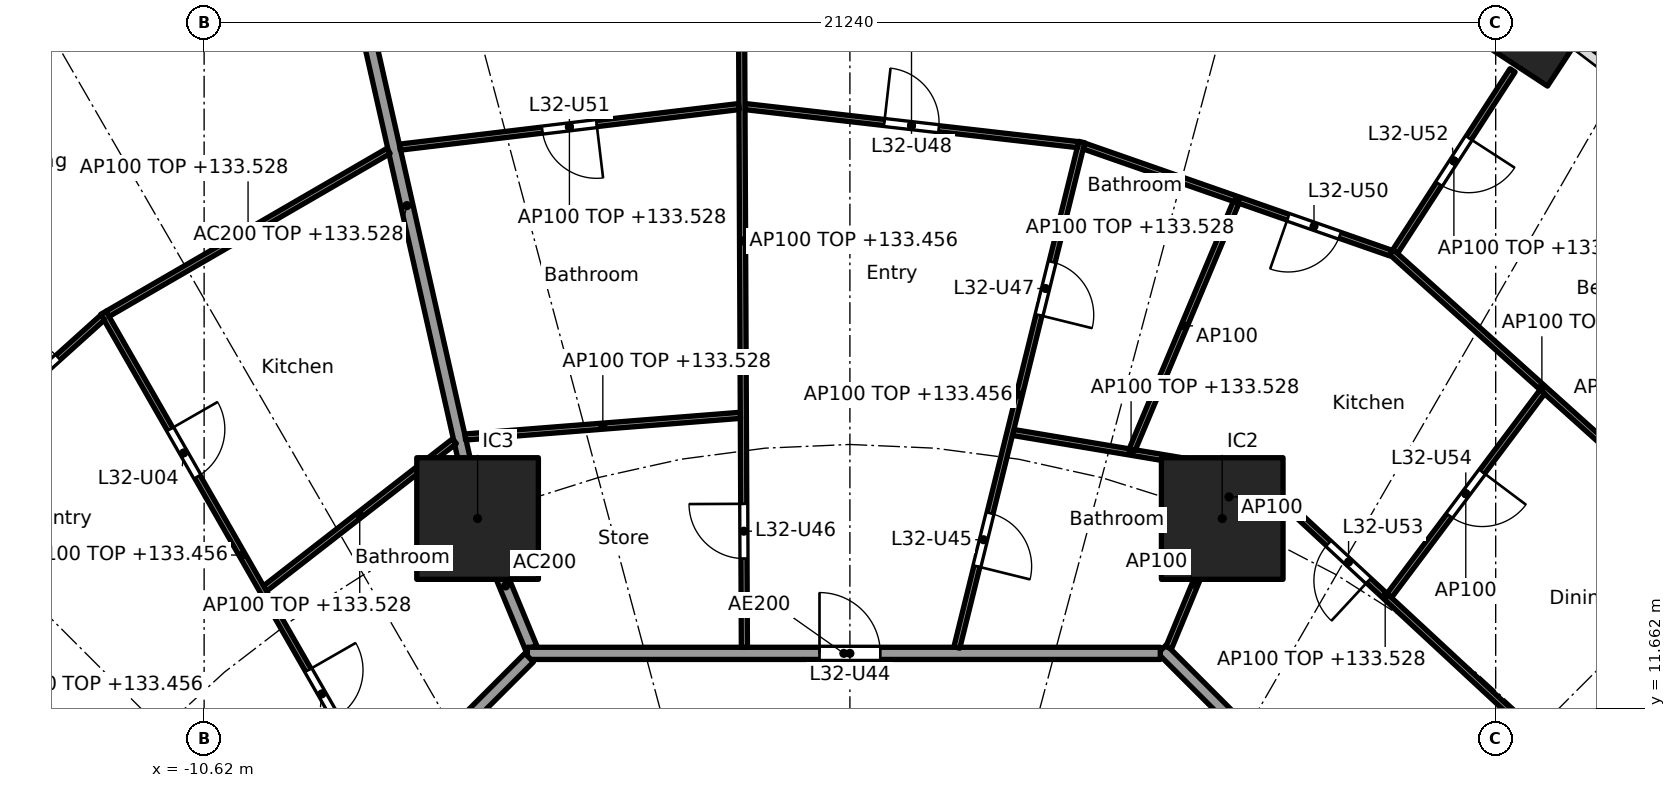
"""IFC4 building model, lengths in metres.
Left out: names, types, materials, properties, quantities, classifications, styles, units other than length and angle.
Written with IfcOpenShell. Run it as: python <this file> out.ifc"""

import sys

from ifc_helpers import new_model, si_unit, direction, frame, frame_2d, origin, origin_2d, place, context, subcontext, project, spatial, rectangle, hollow_rectangle, extrude, element, fill, save


model = new_model("IFC4")
c1 = context("Model", 3, precision=1e-05, world=origin(), true_north=direction((0.0, 1.0)))
c2 = subcontext(c1, "Body", "Model", "MODEL_VIEW")
j1 = project(units=[si_unit("LENGTHUNIT", "METRE"), si_unit("PLANEANGLEUNIT", "RADIAN")], contexts=[c1])
p1 = place(None, origin())
s1 = spatial("IfcSite", under=j1, at=p1, CompositionType="ELEMENT")
p2 = place(p1, origin())
s2 = spatial("IfcBuilding", under=s1, at=p2, CompositionType="ELEMENT")
p3 = place(p2, frame((0.0, 0.0, 130.7)))
s3 = spatial("IfcBuildingStorey", under=s2, at=p3, CompositionType="ELEMENT", Elevation=130.7)
p4 = place(p3, frame((11.218, 22.599, 0.0), z_axis=(0.0, 0.0, 1.0), x_axis=(-0.835766105673, 0.54908561865, 0.0)))
e1 = element("IfcColumn", 1, at=p4, inside=s3, PredefinedType="COLUMN", context=c2, shape_type="SweptSolid", body=[
    extrude(hollow_rectangle(XDim=1.2, YDim=0.9, WallThickness=0.04, at=origin_2d()), origin(), (0.0, 0.0, 1.0), 3.7),
])
for number, where, z_axis, x_axis in (
    (2, (6.123, 14.782, 0.0), (0.0, 0.0, 1.0), (1.0, 0.0, 0.0)),
    (3, (-6.123, 14.782, 0.0), (0.0, 0.0, 1.0), (1.0, 0.0, 0.0)),
):
    element("IfcColumn", number, at=place(p3, frame(where, z_axis=z_axis, x_axis=x_axis)), inside=s3, PredefinedType="COLUMN", context=c2, shape_type="SweptSolid", body=[
        extrude(rectangle(XDim=2.0, YDim=2.0, at=origin_2d()), origin(), (0.0, 0.0, 1.0), 3.7),
    ])
p5 = place(p3, frame((-5.243, 12.657, 0.0), z_axis=(0.0, 0.0, 1.0), x_axis=(-0.38273085373, 0.923859888513, 0.0)))
e4 = element("IfcWall", 4, at=p5, inside=s3, PredefinedType="PARTITIONING", context=c2, shape_type="SweptSolid", body=[
    extrude(rectangle(XDim=2.199, YDim=0.2, at=frame_2d((1.1, 0.0))), origin(), (0.0, 0.0, 1.0), 3.44),
])
p6 = place(p3, frame((-6.134, 14.831, 0.0), z_axis=(0.0, 0.0, 1.0), x_axis=(-0.220337590808, 0.975423675167, 0.0)))
e5 = element("IfcWall", 5, at=p6, inside=s3, PredefinedType="PARTITIONING", context=c2, shape_type="SweptSolid", body=[
    extrude(rectangle(XDim=10.451, YDim=0.2, at=frame_2d((5.226, 0.0))), origin(), (0.0, 0.0, 1.0), 2.828),
])
p7 = place(p3, frame((12.635, 5.134, 0.0), z_axis=(0.0, 0.0, 1.0), x_axis=(-0.707106781187, 0.707106781187, 0.0)))
e6 = element("IfcWall", 6, at=p7, inside=s3, PredefinedType="PARTITIONING", context=c2, shape_type="SweptSolid", body=[
    extrude(rectangle(XDim=10.609, YDim=0.2, at=frame_2d((5.305, 0.0))), origin(), (0.0, 0.0, 1.0), 3.44),
])
p8 = place(p3, frame((5.104, 12.565, 0.0), z_axis=(0.0, 0.0, 1.0), x_axis=(-1.0, 0.0, 0.0)))
e7 = element("IfcWall", 7, at=p8, inside=s3, PredefinedType="PARTITIONING", context=c2, shape_type="SweptSolid", body=[
    extrude(rectangle(XDim=10.409, YDim=0.2, at=frame_2d((5.205, 0.0))), origin(), (0.0, 0.0, 1.0), 3.44),
])
p9 = place(p8, frame((4.604, 0.0, 0.0)))
e8 = element("IfcOpeningElement", 8, at=p9, cuts=e7, PredefinedType="OPENING", context=c2, shape_type="SweptSolid", body=[
    extrude(rectangle(XDim=1.0, YDim=2.1, at=frame_2d((0.5, 1.05))), frame((0.0, 0.11, 0.0), z_axis=(0.0, -1.0, 0.0), x_axis=(1.0, 0.0, 0.0)), (0.0, 0.0, 1.0), 0.22),
])
p10 = place(p3, frame((-5.275, 12.494, 0.0), z_axis=(0.0, 0.0, 1.0), x_axis=(-0.707106781187, -0.707106781187, 0.0)))
e9 = element("IfcWall", 9, at=p10, inside=s3, PredefinedType="PARTITIONING", context=c2, shape_type="SweptSolid", body=[
    extrude(rectangle(XDim=10.209, YDim=0.2, at=frame_2d((5.104, 0.0))), origin(), (0.0, 0.0, 1.0), 3.44),
])
p11 = place(p10, frame((4.604, 0.0, 0.0)))
e10 = element("IfcOpeningElement", 10, at=p11, cuts=e9, PredefinedType="OPENING", context=c2, shape_type="SweptSolid", body=[
    extrude(rectangle(XDim=1.0, YDim=2.1, at=frame_2d((0.5, 1.05))), frame((0.0, 0.11, 0.0), z_axis=(0.0, -1.0, 0.0), x_axis=(1.0, 0.0, 0.0)), (0.0, 0.0, 1.0), 0.22),
])
p12 = place(p3, frame((11.029, 11.443, 0.0), z_axis=(0.0, 0.0, 1.0), x_axis=(-0.733121281629, 0.680097924143, 0.0)))
e11 = element("IfcWall", 11, at=p12, inside=s3, PredefinedType="PARTITIONING", context=c2, shape_type="SweptSolid", body=[
    extrude(rectangle(XDim=6.073, YDim=0.1, at=frame_2d((3.037, 0.0))), origin(), (0.0, 0.0, 1.0), 2.828),
])
p13 = place(p12, frame((3.408, 0.0, 0.0)))
e12 = element("IfcOpeningElement", 12, at=p13, cuts=e11, PredefinedType="OPENING", context=c2, shape_type="SweptSolid", body=[
    extrude(rectangle(XDim=0.9, YDim=2.1, at=frame_2d((0.45, 1.05))), frame((0.0, 0.06, 0.0), z_axis=(0.0, -1.0, 0.0), x_axis=(1.0, 0.0, 0.0)), (0.0, 0.0, 1.0), 0.12),
])
p14 = place(p3, frame((13.856, 14.714, 0.0), z_axis=(0.0, 0.0, 1.0), x_axis=(-0.743793479211, 0.668409500444, 0.0)))
e13 = element("IfcWall", 13, at=p14, inside=s3, PredefinedType="PARTITIONING", context=c2, shape_type="SweptSolid", body=[
    extrude(rectangle(XDim=6.659, YDim=0.1, at=frame_2d((3.329, 0.0))), origin(), (0.0, 0.0, 1.0), 2.828),
])
p15 = place(p3, frame((8.87, 13.514, 0.0), z_axis=(0.0, 0.0, 1.0), x_axis=(0.600475102839, 0.79964345234, 0.0)))
e14 = element("IfcWall", 14, at=p15, inside=s3, PredefinedType="PARTITIONING", context=c2, shape_type="SweptSolid", body=[
    extrude(rectangle(XDim=4.192, YDim=0.1, at=frame_2d((2.096, 0.0))), origin(), (0.0, 0.0, 1.0), 3.44),
])
p16 = place(p15, frame((1.646, 0.0, 0.0)))
e15 = element("IfcOpeningElement", 15, at=p16, cuts=e14, PredefinedType="OPENING", context=c2, shape_type="SweptSolid", body=[
    extrude(rectangle(XDim=0.9, YDim=2.1, at=frame_2d((0.45, 1.05))), frame((0.0, 0.06, 0.0), z_axis=(0.0, -1.0, 0.0), x_axis=(1.0, 0.0, 0.0)), (0.0, 0.0, 1.0), 0.12),
])
p17 = place(p3, frame((5.243, 12.657, 0.0), z_axis=(0.0, 0.0, 1.0), x_axis=(0.382719158442, 0.923864733477, 0.0)))
e16 = element("IfcWall", 16, at=p17, inside=s3, PredefinedType="PARTITIONING", context=c2, shape_type="SweptSolid", body=[
    extrude(rectangle(XDim=2.25, YDim=0.1, at=frame_2d((1.125, 0.0))), origin(), (0.0, 0.0, 1.0), 3.44),
])
p18 = place(p3, frame((6.564, 15.547, 0.0), z_axis=(0.0, 0.0, 1.0), x_axis=(-0.986269521186, 0.165143669511, 0.0)))
e17 = element("IfcWall", 17, at=p18, inside=s3, PredefinedType="PARTITIONING", context=c2, shape_type="SweptSolid", body=[
    extrude(rectangle(XDim=3.934, YDim=0.1, at=frame_2d((1.967, 0.0))), origin(), (0.0, 0.0, 1.0), 2.828),
])
p19 = place(p3, frame((8.968, 19.174, 0.0), z_axis=(0.0, 0.0, 1.0), x_axis=(0.543713319379, 0.83927100887, 0.0)))
e18 = element("IfcWall", 18, at=p19, inside=s3, PredefinedType="PARTITIONING", context=c2, shape_type="SweptSolid", body=[
    extrude(rectangle(XDim=3.549, YDim=0.1, at=frame_2d((1.774, 0.0))), origin(), (0.0, 0.0, 1.0), 2.828),
])
p20 = place(p19, frame((1.324, 0.0, 0.0)))
e19 = element("IfcOpeningElement", 19, at=p20, cuts=e18, PredefinedType="OPENING", context=c2, shape_type="SweptSolid", body=[
    extrude(rectangle(XDim=0.9, YDim=2.1, at=frame_2d((0.45, 1.05))), frame((0.0, 0.06, 0.0), z_axis=(0.0, -1.0, 0.0), x_axis=(1.0, 0.0, 0.0)), (0.0, 0.0, 1.0), 0.12),
])
p21 = place(p3, frame((8.894, 19.148, 0.0), z_axis=(0.0, 0.0, 1.0), x_axis=(-0.944182005381, 0.329424256414, 0.0)))
e20 = element("IfcWall", 20, at=p21, inside=s3, PredefinedType="PARTITIONING", context=c2, shape_type="SweptSolid", body=[
    extrude(rectangle(XDim=5.344, YDim=0.1, at=frame_2d((2.672, 0.0))), origin(), (0.0, 0.0, 1.0), 2.828),
])
p22 = place(p21, frame((0.886, 0.0, 0.0)))
e21 = element("IfcOpeningElement", 21, at=p22, cuts=e20, PredefinedType="OPENING", context=c2, shape_type="SweptSolid", body=[
    extrude(rectangle(XDim=0.9, YDim=2.1, at=frame_2d((0.45, 1.05))), frame((0.0, 0.06, 0.0), z_axis=(0.0, -1.0, 0.0), x_axis=(1.0, 0.0, 0.0)), (0.0, 0.0, 1.0), 0.12),
])
p23 = place(p3, frame((4.643, 15.918, 0.0), z_axis=(0.0, 0.0, 1.0), x_axis=(0.387539433367, 0.921853126906, 0.0)))
e22 = element("IfcWall", 22, at=p23, inside=s3, PredefinedType="PARTITIONING", context=c2, shape_type="SweptSolid", body=[
    extrude(rectangle(XDim=4.408, YDim=0.1, at=frame_2d((2.204, 0.0))), origin(), (0.0, 0.0, 1.0), 3.44),
])
p24 = place(p3, frame((1.759, 12.662, 0.0), z_axis=(0.0, 0.0, 1.0), x_axis=(0.239964949221, 0.970781552743, 0.0)))
e23 = element("IfcWall", 23, at=p24, inside=s3, PredefinedType="PARTITIONING", context=c2, shape_type="SweptSolid", body=[
    extrude(rectangle(XDim=8.562, YDim=0.1, at=frame_2d((4.281, 0.0))), origin(), (0.0, 0.0, 1.0), 2.756),
])
p25 = place(p24, frame((1.375, 0.0, 0.0)))
e24 = element("IfcOpeningElement", 24, at=p25, cuts=e23, PredefinedType="OPENING", context=c2, shape_type="SweptSolid", body=[
    extrude(rectangle(XDim=0.9, YDim=2.1, at=frame_2d((0.45, 1.05))), frame((0.0, 0.06, 0.0), z_axis=(0.0, -1.0, 0.0), x_axis=(1.0, 0.0, 0.0)), (0.0, 0.0, 1.0), 0.12),
])
p26 = place(p24, frame((5.631, 0.0, 0.0)))
e25 = element("IfcOpeningElement", 25, at=p26, cuts=e23, PredefinedType="OPENING", context=c2, shape_type="SweptSolid", body=[
    extrude(rectangle(XDim=0.9, YDim=2.1, at=frame_2d((0.45, 1.05))), frame((0.0, 0.06, 0.0), z_axis=(0.0, -1.0, 0.0), x_axis=(1.0, 0.0, 0.0)), (0.0, 0.0, 1.0), 0.12),
])
p27 = place(p3, frame((3.751, 20.93, 0.0), z_axis=(0.0, 0.0, 1.0), x_axis=(-0.993522105273, 0.113639017658, 0.0)))
e26 = element("IfcWall", 26, at=p27, inside=s3, PredefinedType="PARTITIONING", context=c2, shape_type="SweptSolid", body=[
    extrude(rectangle(XDim=5.513, YDim=0.1, at=frame_2d((2.756, 0.0))), origin(), (0.0, 0.0, 1.0), 2.828),
])
p28 = place(p27, frame((2.306, 0.0, 0.0)))
e27 = element("IfcOpeningElement", 27, at=p28, cuts=e26, PredefinedType="OPENING", context=c2, shape_type="SweptSolid", body=[
    extrude(rectangle(XDim=0.9, YDim=2.1, at=frame_2d((0.45, 1.05))), frame((0.0, 0.06, 0.0), z_axis=(0.0, -1.0, 0.0), x_axis=(1.0, 0.0, 0.0)), (0.0, 0.0, 1.0), 0.12),
])
p29 = place(p3, frame((-1.735, 12.665, 0.0), z_axis=(0.0, 0.0, 1.0), x_axis=(-0.004494500855, 0.99998989968, 0.0)))
e28 = element("IfcWall", 28, at=p29, inside=s3, PredefinedType="PARTITIONING", context=c2, shape_type="SweptSolid", body=[
    extrude(rectangle(XDim=13.363, YDim=0.1, at=frame_2d((6.681, 0.0))), origin(), (0.0, 0.0, 1.0), 2.756),
])
p30 = place(p29, frame((1.459, 0.0, 0.0)))
e29 = element("IfcOpeningElement", 29, at=p30, cuts=e28, PredefinedType="OPENING", context=c2, shape_type="SweptSolid", body=[
    extrude(rectangle(XDim=0.9, YDim=2.1, at=frame_2d((0.45, 1.05))), frame((0.0, 0.06, 0.0), z_axis=(0.0, -1.0, 0.0), x_axis=(1.0, 0.0, 0.0)), (0.0, 0.0, 1.0), 0.12),
])
p31 = place(p29, frame((10.68, 0.0, 0.0)))
e30 = element("IfcOpeningElement", 30, at=p31, cuts=e28, PredefinedType="OPENING", context=c2, shape_type="SweptSolid", body=[
    extrude(rectangle(XDim=0.9, YDim=2.1, at=frame_2d((0.45, 1.05))), frame((0.0, 0.06, 0.0), z_axis=(0.0, -1.0, 0.0), x_axis=(1.0, 0.0, 0.0)), (0.0, 0.0, 1.0), 0.12),
])
p32 = place(p3, frame((-1.802, 16.479, 0.0), z_axis=(0.0, 0.0, 1.0), x_axis=(-0.996907698294, -0.078581429625, 0.0)))
e31 = element("IfcWall", 31, at=p32, inside=s3, PredefinedType="PARTITIONING", context=c2, shape_type="SweptSolid", body=[
    extrude(rectangle(XDim=4.536, YDim=0.1, at=frame_2d((2.268, 0.0))), origin(), (0.0, 0.0, 1.0), 2.828),
])
p33 = place(p3, frame((-1.825, 21.557, 0.0), z_axis=(0.0, 0.0, 1.0), x_axis=(-0.992915053711, -0.11882632753, 0.0)))
e32 = element("IfcWall", 32, at=p33, inside=s3, PredefinedType="PARTITIONING", context=c2, shape_type="SweptSolid", body=[
    extrude(rectangle(XDim=5.615, YDim=0.1, at=frame_2d((2.808, 0.0))), origin(), (0.0, 0.0, 1.0), 2.828),
])
p34 = place(p33, frame((2.358, 0.0, 0.0)))
e33 = element("IfcOpeningElement", 33, at=p34, cuts=e32, PredefinedType="OPENING", context=c2, shape_type="SweptSolid", body=[
    extrude(rectangle(XDim=0.9, YDim=2.1, at=frame_2d((0.45, 1.05))), frame((0.0, 0.06, 0.0), z_axis=(0.0, -1.0, 0.0), x_axis=(1.0, 0.0, 0.0)), (0.0, 0.0, 1.0), 0.12),
])
p35 = place(p3, frame((-6.503, 16.054, 0.0), z_axis=(0.0, 0.0, 1.0), x_axis=(-0.789428807693, -0.613842127574, 0.0)))
e34 = element("IfcWall", 34, at=p35, inside=s3, PredefinedType="PARTITIONING", context=c2, shape_type="SweptSolid", body=[
    extrude(rectangle(XDim=3.948, YDim=0.1, at=frame_2d((1.974, 0.0))), origin(), (0.0, 0.0, 1.0), 2.828),
])
p36 = place(p3, frame((-7.586, 20.827, 0.0), z_axis=(0.0, 0.0, 1.0), x_axis=(-0.865093450578, -0.501610727325, 0.0)))
e35 = element("IfcWall", 35, at=p36, inside=s3, PredefinedType="PARTITIONING", context=c2, shape_type="SweptSolid", body=[
    extrude(rectangle(XDim=5.343, YDim=0.1, at=frame_2d((2.671, 0.0))), origin(), (0.0, 0.0, 1.0), 2.828),
])
p37 = place(p3, frame((-7.708, 10.198, 0.0), z_axis=(0.0, 0.0, 1.0), x_axis=(-0.497449462689, 0.867492957937, 0.0)))
e36 = element("IfcWall", 36, at=p37, inside=s3, PredefinedType="PARTITIONING", context=c2, shape_type="SweptSolid", body=[
    extrude(rectangle(XDim=9.185, YDim=0.1, at=frame_2d((4.592, 0.0))), origin(), (0.0, 0.0, 1.0), 2.756),
])
p38 = place(p37, frame((1.511, 0.0, 0.0)))
e37 = element("IfcOpeningElement", 37, at=p38, cuts=e36, PredefinedType="OPENING", context=c2, shape_type="SweptSolid", body=[
    extrude(rectangle(XDim=0.9, YDim=2.1, at=frame_2d((0.45, 1.05))), frame((0.0, 0.06, 0.0), z_axis=(0.0, -1.0, 0.0), x_axis=(1.0, 0.0, 0.0)), (0.0, 0.0, 1.0), 0.12),
])
p39 = place(p37, frame((6.078, 0.0, 0.0)))
e38 = element("IfcOpeningElement", 38, at=p39, cuts=e36, PredefinedType="OPENING", context=c2, shape_type="SweptSolid", body=[
    extrude(rectangle(XDim=0.9, YDim=2.1, at=frame_2d((0.45, 1.05))), frame((0.0, 0.06, 0.0), z_axis=(0.0, -1.0, 0.0), x_axis=(1.0, 0.0, 0.0)), (0.0, 0.0, 1.0), 0.12),
])
p40 = place(p3, frame((-12.289, 18.089, 0.0), z_axis=(0.0, 0.0, 1.0), x_axis=(-0.743146066164, -0.669129228435, 0.0)))
e39 = element("IfcWall", 39, at=p40, inside=s3, PredefinedType="PARTITIONING", context=c2, shape_type="SweptSolid", body=[
    extrude(rectangle(XDim=5.739, YDim=0.1, at=frame_2d((2.87, 0.0))), origin(), (0.0, 0.0, 1.0), 2.828),
])
p41 = place(p40, frame((0.985, 0.0, 0.0)))
e40 = element("IfcOpeningElement", 40, at=p41, cuts=e39, PredefinedType="OPENING", context=c2, shape_type="SweptSolid", body=[
    extrude(rectangle(XDim=0.9, YDim=2.1, at=frame_2d((0.45, 1.05))), frame((0.0, 0.06, 0.0), z_axis=(0.0, -1.0, 0.0), x_axis=(1.0, 0.0, 0.0)), (0.0, 0.0, 1.0), 0.12),
])
p42 = place(p3, frame((-10.182, 7.729, 0.0), z_axis=(0.0, 0.0, 1.0), x_axis=(-0.702927211734, 0.711261790766, 0.0)))
e41 = element("IfcWall", 41, at=p42, inside=s3, PredefinedType="PARTITIONING", context=c2, shape_type="SweptSolid", body=[
    extrude(rectangle(XDim=9.168, YDim=0.1, at=frame_2d((4.584, 0.0))), origin(), (0.0, 0.0, 1.0), 2.756),
])
p43 = place(p42, frame((1.507, 0.0, 0.0)))
e42 = element("IfcOpeningElement", 42, at=p43, cuts=e41, PredefinedType="OPENING", context=c2, shape_type="SweptSolid", body=[
    extrude(rectangle(XDim=0.9, YDim=2.1, at=frame_2d((0.45, 1.05))), frame((0.0, 0.06, 0.0), z_axis=(0.0, -1.0, 0.0), x_axis=(1.0, 0.0, 0.0)), (0.0, 0.0, 1.0), 0.12),
])
p44 = place(p42, frame((6.067, 0.0, 0.0)))
e43 = element("IfcOpeningElement", 43, at=p44, cuts=e41, PredefinedType="OPENING", context=c2, shape_type="SweptSolid", body=[
    extrude(rectangle(XDim=0.9, YDim=2.1, at=frame_2d((0.45, 1.05))), frame((0.0, 0.06, 0.0), z_axis=(0.0, -1.0, 0.0), x_axis=(1.0, 0.0, 0.0)), (0.0, 0.0, 1.0), 0.12),
])
p45 = place(p3, frame((6.417, 15.42, 0.0), z_axis=(0.0, 0.0, 1.0), x_axis=(-0.543777264953, -0.839229578911, 0.0)))
e44 = element("IfcWall", 44, at=p45, inside=s3, PredefinedType="PARTITIONING", context=c2, shape_type="SweptSolid", body=[
    extrude(rectangle(XDim=0.673, YDim=0.1, at=frame_2d((0.337, 0.0))), origin(), (0.0, 0.0, 1.0), 3.44),
])
p46 = place(p38, frame((0.9, 0.0, 0.0), x_axis=(-1.0, 0.0, 0.0)))
e45 = element("IfcDoor", 45, at=p46, inside=s3, OperationType="SINGLE_SWING_LEFT", PredefinedType="DOOR", context=c2, shape_type="SweptSolid", body=[
    extrude(rectangle(XDim=0.9, YDim=2.1, at=frame_2d((0.45, 1.05))), frame((0.0, 0.025, 0.0), z_axis=(0.0, -1.0, 0.0), x_axis=(1.0, 0.0, 0.0)), (0.0, 0.0, 1.0), 0.05),
])
fill(e37, e45)
p47 = place(p39, frame((0.9, 0.0, 0.0), x_axis=(-1.0, 0.0, 0.0)))
e46 = element("IfcDoor", 46, at=p47, inside=s3, OperationType="SINGLE_SWING_LEFT", PredefinedType="DOOR", context=c2, shape_type="SweptSolid", body=[
    extrude(rectangle(XDim=0.9, YDim=2.1, at=frame_2d((0.45, 1.05))), frame((0.0, 0.025, 0.0), z_axis=(0.0, -1.0, 0.0), x_axis=(1.0, 0.0, 0.0)), (0.0, 0.0, 1.0), 0.05),
])
fill(e38, e46)
p48 = place(p41, frame((0.9, 0.0, 0.0), x_axis=(-1.0, 0.0, 0.0)))
e47 = element("IfcDoor", 47, at=p48, inside=s3, OperationType="SINGLE_SWING_LEFT", PredefinedType="DOOR", context=c2, shape_type="SweptSolid", body=[
    extrude(rectangle(XDim=0.9, YDim=2.1, at=frame_2d((0.45, 1.05))), frame((0.0, 0.025, 0.0), z_axis=(0.0, -1.0, 0.0), x_axis=(1.0, 0.0, 0.0)), (0.0, 0.0, 1.0), 0.05),
])
fill(e40, e47)
p49 = place(p9, frame((1.0, 0.0, 0.0), x_axis=(-1.0, 0.0, 0.0)))
e48 = element("IfcDoor", 48, at=p49, inside=s3, OperationType="SINGLE_SWING_LEFT", PredefinedType="DOOR", context=c2, shape_type="SweptSolid", body=[
    extrude(rectangle(XDim=1.0, YDim=2.1, at=frame_2d((0.5, 1.05))), frame((0.0, 0.025, 0.0), z_axis=(0.0, -1.0, 0.0), x_axis=(1.0, 0.0, 0.0)), (0.0, 0.0, 1.0), 0.05),
])
fill(e8, e48)
p50 = place(p25, frame((0.9, 0.0, 0.0), x_axis=(-1.0, 0.0, 0.0)))
e49 = element("IfcDoor", 49, at=p50, inside=s3, OperationType="SINGLE_SWING_RIGHT", PredefinedType="DOOR", context=c2, shape_type="SweptSolid", body=[
    extrude(rectangle(XDim=0.9, YDim=2.1, at=frame_2d((0.45, 1.05))), frame((0.0, 0.025, 0.0), z_axis=(0.0, -1.0, 0.0), x_axis=(1.0, 0.0, 0.0)), (0.0, 0.0, 1.0), 0.05),
])
fill(e24, e49)
p51 = place(p30, origin())
e50 = element("IfcDoor", 50, at=p51, inside=s3, OperationType="SINGLE_SWING_RIGHT", PredefinedType="DOOR", context=c2, shape_type="SweptSolid", body=[
    extrude(rectangle(XDim=0.9, YDim=2.1, at=frame_2d((0.45, 1.05))), frame((0.0, 0.025, 0.0), z_axis=(0.0, -1.0, 0.0), x_axis=(1.0, 0.0, 0.0)), (0.0, 0.0, 1.0), 0.05),
])
fill(e29, e50)
p52 = place(p26, frame((0.9, 0.0, 0.0), x_axis=(-1.0, 0.0, 0.0)))
e51 = element("IfcDoor", 51, at=p52, inside=s3, OperationType="SINGLE_SWING_RIGHT", PredefinedType="DOOR", context=c2, shape_type="SweptSolid", body=[
    extrude(rectangle(XDim=0.9, YDim=2.1, at=frame_2d((0.45, 1.05))), frame((0.0, 0.025, 0.0), z_axis=(0.0, -1.0, 0.0), x_axis=(1.0, 0.0, 0.0)), (0.0, 0.0, 1.0), 0.05),
])
fill(e25, e51)
p53 = place(p28, frame((0.9, 0.0, 0.0), x_axis=(-1.0, 0.0, 0.0)))
e52 = element("IfcDoor", 52, at=p53, inside=s3, OperationType="SINGLE_SWING_LEFT", PredefinedType="DOOR", context=c2, shape_type="SweptSolid", body=[
    extrude(rectangle(XDim=0.9, YDim=2.1, at=frame_2d((0.45, 1.05))), frame((0.0, 0.025, 0.0), z_axis=(0.0, -1.0, 0.0), x_axis=(1.0, 0.0, 0.0)), (0.0, 0.0, 1.0), 0.05),
])
fill(e27, e52)
p54 = place(p22, origin())
e53 = element("IfcDoor", 53, at=p54, inside=s3, OperationType="SINGLE_SWING_RIGHT", PredefinedType="DOOR", context=c2, shape_type="SweptSolid", body=[
    extrude(rectangle(XDim=0.9, YDim=2.1, at=frame_2d((0.45, 1.05))), frame((0.0, 0.025, 0.0), z_axis=(0.0, -1.0, 0.0), x_axis=(1.0, 0.0, 0.0)), (0.0, 0.0, 1.0), 0.05),
])
fill(e21, e53)
p55 = place(p34, origin())
e54 = element("IfcDoor", 54, at=p55, inside=s3, OperationType="SINGLE_SWING_LEFT", PredefinedType="DOOR", context=c2, shape_type="SweptSolid", body=[
    extrude(rectangle(XDim=0.9, YDim=2.1, at=frame_2d((0.45, 1.05))), frame((0.0, 0.025, 0.0), z_axis=(0.0, -1.0, 0.0), x_axis=(1.0, 0.0, 0.0)), (0.0, 0.0, 1.0), 0.05),
])
fill(e33, e54)
p56 = place(p20, frame((0.9, 0.0, 0.0), x_axis=(-1.0, 0.0, 0.0)))
e55 = element("IfcDoor", 55, at=p56, inside=s3, OperationType="SINGLE_SWING_LEFT", PredefinedType="DOOR", context=c2, shape_type="SweptSolid", body=[
    extrude(rectangle(XDim=0.9, YDim=2.1, at=frame_2d((0.45, 1.05))), frame((0.0, 0.025, 0.0), z_axis=(0.0, -1.0, 0.0), x_axis=(1.0, 0.0, 0.0)), (0.0, 0.0, 1.0), 0.05),
])
fill(e19, e55)
p57 = place(p13, origin())
e56 = element("IfcDoor", 56, at=p57, inside=s3, OperationType="SINGLE_SWING_LEFT", PredefinedType="DOOR", context=c2, shape_type="SweptSolid", body=[
    extrude(rectangle(XDim=0.9, YDim=2.1, at=frame_2d((0.45, 1.05))), frame((0.0, 0.025, 0.0), z_axis=(0.0, -1.0, 0.0), x_axis=(1.0, 0.0, 0.0)), (0.0, 0.0, 1.0), 0.05),
])
fill(e12, e56)
p58 = place(p16, frame((0.9, 0.0, 0.0), x_axis=(-1.0, 0.0, 0.0)))
e57 = element("IfcDoor", 57, at=p58, inside=s3, OperationType="SINGLE_SWING_LEFT", PredefinedType="DOOR", context=c2, shape_type="SweptSolid", body=[
    extrude(rectangle(XDim=0.9, YDim=2.1, at=frame_2d((0.45, 1.05))), frame((0.0, 0.025, 0.0), z_axis=(0.0, -1.0, 0.0), x_axis=(1.0, 0.0, 0.0)), (0.0, 0.0, 1.0), 0.05),
])
fill(e15, e57)
save(model, sys.argv[1])
